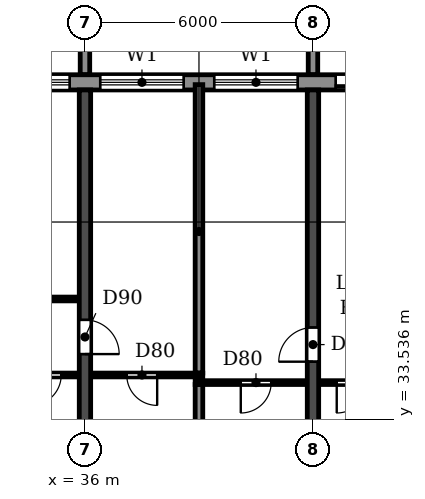
"""IFC4 building model, lengths in metres.
Left out: names, types, materials, properties, quantities, classifications, styles, units other than length and angle.
Written with IfcOpenShell. Run it as: python <this file> out.ifc"""

import sys

from ifc_helpers import new_model, si_unit, direction, frame, frame_2d, origin, place, context, subcontext, project, spatial, polyline, rectangle, outline, extrude, source, transform, mapped, element, fill, save


model = new_model("IFC4")
c1 = context("Model", 3, precision=1e-05, world=origin(), true_north=direction((0.0, 1.0)))
c2 = subcontext(c1, "Body", "Model", "MODEL_VIEW")
j1 = project(units=[si_unit("LENGTHUNIT", "METRE"), si_unit("PLANEANGLEUNIT", "RADIAN")], contexts=[c1])
p1 = place(None, origin())
s1 = spatial("IfcSite", under=j1, at=p1, CompositionType="ELEMENT")
p2 = place(p1, origin())
s2 = spatial("IfcBuilding", under=s1, at=p2, CompositionType="ELEMENT")
p3 = place(p2, frame((0.0, 0.0, 155.4)))
s3 = spatial("IfcBuildingStorey", under=s2, at=p3, CompositionType="ELEMENT", Elevation=155.4)
p4 = place(p3, frame((36.0, 30.525, 0.0), z_axis=(0.0, 0.0, 1.0), x_axis=(0.0, 1.0, 0.0)))
e1 = element("IfcWall", 1, at=p4, inside=s3, PredefinedType="SHEAR", context=c2, shape_type="SweptSolid", body=[
    extrude(rectangle(XDim=11.675, YDim=0.3, at=frame_2d((5.837, 0.0))), origin(), (0.0, 0.0, 1.0), 3.0),
])
p5 = place(p4, frame((4.725, 0.0, 0.0)))
e2 = element("IfcOpeningElement", 2, at=p5, cuts=e1, PredefinedType="OPENING", context=c2, shape_type="SweptSolid", body=[
    extrude(rectangle(XDim=0.9, YDim=2.1, at=frame_2d((0.45, 1.05))), frame((0.0, 0.16, 0.0), z_axis=(0.0, -1.0, 0.0), x_axis=(1.0, 0.0, 0.0)), (0.0, 0.0, 1.0), 0.32),
])
p6 = place(p3, frame((42.0, 30.525, 0.0), z_axis=(0.0, 0.0, 1.0), x_axis=(0.0, 1.0, 0.0)))
e3 = element("IfcWall", 3, at=p6, inside=s3, PredefinedType="SHEAR", context=c2, shape_type="SweptSolid", body=[
    extrude(rectangle(XDim=11.675, YDim=0.3, at=frame_2d((5.837, 0.0))), origin(), (0.0, 0.0, 1.0), 3.0),
])
p7 = place(p6, frame((4.525, 0.0, 0.0)))
e4 = element("IfcOpeningElement", 4, at=p7, cuts=e3, PredefinedType="OPENING", context=c2, shape_type="SweptSolid", body=[
    extrude(rectangle(XDim=0.9, YDim=2.1, at=frame_2d((0.45, 1.05))), frame((0.0, 0.16, 0.0), z_axis=(0.0, -1.0, 0.0), x_axis=(1.0, 0.0, 0.0)), (0.0, 0.0, 1.0), 0.32),
])
p8 = place(p3, frame((85.317, 42.4, 0.0), z_axis=(0.0, 0.0, 1.0), x_axis=(-1.0, 0.0, 0.0)))
e5 = element("IfcWall", 5, at=p8, inside=s3, PredefinedType="STANDARD", context=c2, shape_type="SweptSolid", body=[
    extrude(rectangle(XDim=68.634, YDim=0.4, at=frame_2d((34.317, 0.0))), origin(), (0.0, 0.0, 1.0), 3.0),
])
p9 = place(p8, frame((64.917, 0.0, 0.0)))
e6 = element("IfcOpeningElement", 6, at=p9, cuts=e5, PredefinedType="OPENING", context=c2, shape_type="SweptSolid", body=[
    extrude(rectangle(XDim=1.8, YDim=2.4, at=frame_2d((0.9, 1.2))), frame((0.0, 0.21, 0.0), z_axis=(0.0, -1.0, 0.0), x_axis=(1.0, 0.0, 0.0)), (0.0, 0.0, 1.0), 0.42),
])
p10 = place(p8, frame((61.717, 0.0, 0.9)))
e7 = element("IfcOpeningElement", 7, at=p10, cuts=e5, PredefinedType="OPENING", context=c2, shape_type="SweptSolid", body=[
    extrude(rectangle(XDim=2.2, YDim=1.5, at=frame_2d((1.1, 0.75))), frame((0.0, 0.21, 0.0), z_axis=(0.0, -1.0, 0.0), x_axis=(1.0, 0.0, 0.0)), (0.0, 0.0, 1.0), 0.42),
])
p11 = place(p8, frame((58.717, 0.0, 0.9)))
e8 = element("IfcOpeningElement", 8, at=p11, cuts=e5, PredefinedType="OPENING", context=c2, shape_type="SweptSolid", body=[
    extrude(rectangle(XDim=2.2, YDim=1.5, at=frame_2d((1.1, 0.75))), frame((0.0, 0.21, 0.0), z_axis=(0.0, -1.0, 0.0), x_axis=(1.0, 0.0, 0.0)), (0.0, 0.0, 1.0), 0.42),
])
p12 = place(p8, frame((55.917, 0.0, 0.0)))
e9 = element("IfcOpeningElement", 9, at=p12, cuts=e5, PredefinedType="OPENING", context=c2, shape_type="SweptSolid", body=[
    extrude(rectangle(XDim=1.8, YDim=2.4, at=frame_2d((0.9, 1.2))), frame((0.0, 0.21, 0.0), z_axis=(0.0, -1.0, 0.0), x_axis=(1.0, 0.0, 0.0)), (0.0, 0.0, 1.0), 0.42),
])
p13 = place(p8, frame((52.917, 0.0, 0.0)))
e10 = element("IfcOpeningElement", 10, at=p13, cuts=e5, PredefinedType="OPENING", context=c2, shape_type="SweptSolid", body=[
    extrude(rectangle(XDim=1.8, YDim=2.4, at=frame_2d((0.9, 1.2))), frame((0.0, 0.21, 0.0), z_axis=(0.0, -1.0, 0.0), x_axis=(1.0, 0.0, 0.0)), (0.0, 0.0, 1.0), 0.42),
])
p14 = place(p8, frame((49.717, 0.0, 0.9)))
e11 = element("IfcOpeningElement", 11, at=p14, cuts=e5, PredefinedType="OPENING", context=c2, shape_type="SweptSolid", body=[
    extrude(rectangle(XDim=2.2, YDim=1.5, at=frame_2d((1.1, 0.75))), frame((0.0, 0.21, 0.0), z_axis=(0.0, -1.0, 0.0), x_axis=(1.0, 0.0, 0.0)), (0.0, 0.0, 1.0), 0.42),
])
p15 = place(p8, frame((46.717, 0.0, 0.9)))
e12 = element("IfcOpeningElement", 12, at=p15, cuts=e5, PredefinedType="OPENING", context=c2, shape_type="SweptSolid", body=[
    extrude(rectangle(XDim=2.2, YDim=1.5, at=frame_2d((1.1, 0.75))), frame((0.0, 0.21, 0.0), z_axis=(0.0, -1.0, 0.0), x_axis=(1.0, 0.0, 0.0)), (0.0, 0.0, 1.0), 0.42),
])
p16 = place(p8, frame((43.717, 0.0, 0.9)))
e13 = element("IfcOpeningElement", 13, at=p16, cuts=e5, PredefinedType="OPENING", context=c2, shape_type="SweptSolid", body=[
    extrude(rectangle(XDim=2.2, YDim=1.5, at=frame_2d((1.1, 0.75))), frame((0.0, 0.21, 0.0), z_axis=(0.0, -1.0, 0.0), x_axis=(1.0, 0.0, 0.0)), (0.0, 0.0, 1.0), 0.42),
])
p17 = place(p8, frame((40.917, 0.0, 0.0)))
e14 = element("IfcOpeningElement", 14, at=p17, cuts=e5, PredefinedType="OPENING", context=c2, shape_type="SweptSolid", body=[
    extrude(rectangle(XDim=1.8, YDim=2.4, at=frame_2d((0.9, 1.2))), frame((0.0, 0.21, 0.0), z_axis=(0.0, -1.0, 0.0), x_axis=(1.0, 0.0, 0.0)), (0.0, 0.0, 1.0), 0.42),
])
p18 = place(p8, frame((37.717, 0.0, 0.9)))
e15 = element("IfcOpeningElement", 15, at=p18, cuts=e5, PredefinedType="OPENING", context=c2, shape_type="SweptSolid", body=[
    extrude(rectangle(XDim=2.2, YDim=1.5, at=frame_2d((1.1, 0.75))), frame((0.0, 0.21, 0.0), z_axis=(0.0, -1.0, 0.0), x_axis=(1.0, 0.0, 0.0)), (0.0, 0.0, 1.0), 0.42),
])
p19 = place(p8, frame((34.917, 0.0, 0.0)))
e16 = element("IfcOpeningElement", 16, at=p19, cuts=e5, PredefinedType="OPENING", context=c2, shape_type="SweptSolid", body=[
    extrude(rectangle(XDim=1.8, YDim=2.4, at=frame_2d((0.9, 1.2))), frame((0.0, 0.21, 0.0), z_axis=(0.0, -1.0, 0.0), x_axis=(1.0, 0.0, 0.0)), (0.0, 0.0, 1.0), 0.42),
])
p20 = place(p8, frame((31.717, 0.0, 0.9)))
e17 = element("IfcOpeningElement", 17, at=p20, cuts=e5, PredefinedType="OPENING", context=c2, shape_type="SweptSolid", body=[
    extrude(rectangle(XDim=2.2, YDim=1.5, at=frame_2d((1.1, 0.75))), frame((0.0, 0.21, 0.0), z_axis=(0.0, -1.0, 0.0), x_axis=(1.0, 0.0, 0.0)), (0.0, 0.0, 1.0), 0.42),
])
p21 = place(p8, frame((28.717, 0.0, 0.9)))
e18 = element("IfcOpeningElement", 18, at=p21, cuts=e5, PredefinedType="OPENING", context=c2, shape_type="SweptSolid", body=[
    extrude(rectangle(XDim=2.2, YDim=1.5, at=frame_2d((1.1, 0.75))), frame((0.0, 0.21, 0.0), z_axis=(0.0, -1.0, 0.0), x_axis=(1.0, 0.0, 0.0)), (0.0, 0.0, 1.0), 0.42),
])
p22 = place(p8, frame((25.717, 0.0, 0.9)))
e19 = element("IfcOpeningElement", 19, at=p22, cuts=e5, PredefinedType="OPENING", context=c2, shape_type="SweptSolid", body=[
    extrude(rectangle(XDim=2.2, YDim=1.5, at=frame_2d((1.1, 0.75))), frame((0.0, 0.21, 0.0), z_axis=(0.0, -1.0, 0.0), x_axis=(1.0, 0.0, 0.0)), (0.0, 0.0, 1.0), 0.42),
])
p23 = place(p8, frame((22.717, 0.0, 0.9)))
e20 = element("IfcOpeningElement", 20, at=p23, cuts=e5, PredefinedType="OPENING", context=c2, shape_type="SweptSolid", body=[
    extrude(rectangle(XDim=2.2, YDim=1.5, at=frame_2d((1.1, 0.75))), frame((0.0, 0.21, 0.0), z_axis=(0.0, -1.0, 0.0), x_axis=(1.0, 0.0, 0.0)), (0.0, 0.0, 1.0), 0.42),
])
p24 = place(p8, frame((19.917, 0.0, 0.0)))
e21 = element("IfcOpeningElement", 21, at=p24, cuts=e5, PredefinedType="OPENING", context=c2, shape_type="SweptSolid", body=[
    extrude(rectangle(XDim=1.8, YDim=2.4, at=frame_2d((0.9, 1.2))), frame((0.0, 0.21, 0.0), z_axis=(0.0, -1.0, 0.0), x_axis=(1.0, 0.0, 0.0)), (0.0, 0.0, 1.0), 0.42),
])
p25 = place(p8, frame((16.717, 0.0, 0.9)))
e22 = element("IfcOpeningElement", 22, at=p25, cuts=e5, PredefinedType="OPENING", context=c2, shape_type="SweptSolid", body=[
    extrude(rectangle(XDim=2.2, YDim=1.5, at=frame_2d((1.1, 0.75))), frame((0.0, 0.21, 0.0), z_axis=(0.0, -1.0, 0.0), x_axis=(1.0, 0.0, 0.0)), (0.0, 0.0, 1.0), 0.42),
])
p26 = place(p8, frame((13.717, 0.0, 0.9)))
e23 = element("IfcOpeningElement", 23, at=p26, cuts=e5, PredefinedType="OPENING", context=c2, shape_type="SweptSolid", body=[
    extrude(rectangle(XDim=2.2, YDim=1.5, at=frame_2d((1.1, 0.75))), frame((0.0, 0.21, 0.0), z_axis=(0.0, -1.0, 0.0), x_axis=(1.0, 0.0, 0.0)), (0.0, 0.0, 1.0), 0.42),
])
p27 = place(p8, frame((10.917, 0.0, 0.0)))
e24 = element("IfcOpeningElement", 24, at=p27, cuts=e5, PredefinedType="OPENING", context=c2, shape_type="SweptSolid", body=[
    extrude(rectangle(XDim=1.8, YDim=2.4, at=frame_2d((0.9, 1.2))), frame((0.0, 0.21, 0.0), z_axis=(0.0, -1.0, 0.0), x_axis=(1.0, 0.0, 0.0)), (0.0, 0.0, 1.0), 0.42),
])
p28 = place(p8, frame((7.717, 0.0, 0.9)))
e25 = element("IfcOpeningElement", 25, at=p28, cuts=e5, PredefinedType="OPENING", context=c2, shape_type="SweptSolid", body=[
    extrude(rectangle(XDim=2.2, YDim=1.5, at=frame_2d((1.1, 0.75))), frame((0.0, 0.21, 0.0), z_axis=(0.0, -1.0, 0.0), x_axis=(1.0, 0.0, 0.0)), (0.0, 0.0, 1.0), 0.42),
])
p29 = place(p8, frame((4.717, 0.0, 0.9)))
e26 = element("IfcOpeningElement", 26, at=p29, cuts=e5, PredefinedType="OPENING", context=c2, shape_type="SweptSolid", body=[
    extrude(rectangle(XDim=2.2, YDim=1.5, at=frame_2d((1.1, 0.75))), frame((0.0, 0.21, 0.0), z_axis=(0.0, -1.0, 0.0), x_axis=(1.0, 0.0, 0.0)), (0.0, 0.0, 1.0), 0.42),
])
p30 = place(p8, frame((1.917, 0.0, 0.0)))
e27 = element("IfcOpeningElement", 27, at=p30, cuts=e5, PredefinedType="OPENING", context=c2, shape_type="SweptSolid", body=[
    extrude(rectangle(XDim=1.8, YDim=2.4, at=frame_2d((0.9, 1.2))), frame((0.0, 0.21, 0.0), z_axis=(0.0, -1.0, 0.0), x_axis=(1.0, 0.0, 0.0)), (0.0, 0.0, 1.0), 0.42),
])
m1 = source(origin(), c2, "Body", "SweptSolid", [
    extrude(outline(polyline([(0.0, 0.0), (0.25, 0.0), (0.25, 3.1), (0.0, 3.1), (0.0, 0.0)])), origin(), (0.0, 0.0, 1.0), 3.1),
])
for number, where in (
    (28, (35.875, 42.6, 0.0)),
    (29, (41.875, 42.6, 0.0)),
):
    element("IfcWall", number, at=place(p3, frame(where)), inside=s3, PredefinedType="STANDARD", context=c2, shape_type="MappedRepresentation", body=[
        mapped(m1, transform((0.0, 0.0, 0.0))),
    ])
p31 = place(p3, frame((39.0, 30.535, 0.0), z_axis=(0.0, 0.0, 1.0), x_axis=(0.0, 1.0, 0.0)))
e30 = element("IfcWall", 30, at=p31, inside=s3, PredefinedType="PARTITIONING", context=c2, shape_type="SweptSolid", body=[
    extrude(rectangle(XDim=3.915, YDim=0.2, at=frame_2d((1.958, 0.0))), origin(), (0.0, 0.0, 1.0), 3.0),
])
p32 = place(p3, frame((39.0, 34.75, 0.0), z_axis=(0.0, 0.0, 1.0), x_axis=(0.0, 1.0, 0.0)))
e31 = element("IfcWall", 31, at=p32, inside=s3, PredefinedType="PARTITIONING", context=c2, shape_type="SweptSolid", body=[
    extrude(rectangle(XDim=7.59, YDim=0.2, at=frame_2d((3.795, 0.0))), origin(), (0.0, 0.0, 1.0), 3.0),
])
p33 = place(p3, frame((38.9, 34.5, 0.0), z_axis=(0.0, 0.0, 1.0), x_axis=(1.0, 0.0, 0.0)))
e32 = element("IfcWall", 32, at=p33, inside=s3, PredefinedType="PARTITIONING", context=c2, shape_type="SweptSolid", body=[
    extrude(rectangle(XDim=2.94, YDim=0.1, at=frame_2d((1.47, 0.0))), origin(), (0.0, 0.0, 1.0), 3.0),
])
p34 = place(p33, frame((1.2, 0.0, 0.0)))
e33 = element("IfcOpeningElement", 33, at=p34, cuts=e32, PredefinedType="OPENING", context=c2, shape_type="SweptSolid", body=[
    extrude(rectangle(XDim=0.8, YDim=2.1, at=frame_2d((0.4, 1.05))), frame((0.0, 0.06, 0.0), z_axis=(0.0, -1.0, 0.0), x_axis=(1.0, 0.0, 0.0)), (0.0, 0.0, 1.0), 0.12),
])
p35 = place(p3, frame((42.16, 34.5, 0.0), z_axis=(0.0, 0.0, 1.0), x_axis=(1.0, 0.0, 0.0)))
e34 = element("IfcWall", 34, at=p35, inside=s3, PredefinedType="PARTITIONING", context=c2, shape_type="SweptSolid", body=[
    extrude(rectangle(XDim=1.94, YDim=0.1, at=frame_2d((0.97, 0.0))), origin(), (0.0, 0.0, 1.0), 3.0),
])
p36 = place(p35, frame((0.465, 0.0, 0.0)))
e35 = element("IfcOpeningElement", 35, at=p36, cuts=e34, PredefinedType="OPENING", context=c2, shape_type="SweptSolid", body=[
    extrude(rectangle(XDim=0.8, YDim=2.1, at=frame_2d((0.4, 1.05))), frame((0.0, 0.06, 0.0), z_axis=(0.0, -1.0, 0.0), x_axis=(1.0, 0.0, 0.0)), (0.0, 0.0, 1.0), 0.12),
])
p37 = place(p3, frame((33.9, 34.7, 0.0), z_axis=(0.0, 0.0, 1.0), x_axis=(1.0, 0.0, 0.0)))
e36 = element("IfcWall", 36, at=p37, inside=s3, PredefinedType="PARTITIONING", context=c2, shape_type="SweptSolid", body=[
    extrude(rectangle(XDim=1.94, YDim=0.1, at=frame_2d((0.97, 0.0))), origin(), (0.0, 0.0, 1.0), 3.0),
])
p38 = place(p37, frame((0.675, 0.0, 0.0)))
e37 = element("IfcOpeningElement", 37, at=p38, cuts=e36, PredefinedType="OPENING", context=c2, shape_type="SweptSolid", body=[
    extrude(rectangle(XDim=0.8, YDim=2.1, at=frame_2d((0.4, 1.05))), frame((0.0, 0.06, 0.0), z_axis=(0.0, -1.0, 0.0), x_axis=(1.0, 0.0, 0.0)), (0.0, 0.0, 1.0), 0.12),
])
p39 = place(p3, frame((36.16, 34.7, 0.0), z_axis=(0.0, 0.0, 1.0), x_axis=(1.0, 0.0, 0.0)))
e38 = element("IfcWall", 38, at=p39, inside=s3, PredefinedType="PARTITIONING", context=c2, shape_type="SweptSolid", body=[
    extrude(rectangle(XDim=2.94, YDim=0.1, at=frame_2d((1.47, 0.0))), origin(), (0.0, 0.0, 1.0), 3.0),
])
p40 = place(p39, frame((0.94, 0.0, 0.0)))
e39 = element("IfcOpeningElement", 39, at=p40, cuts=e38, PredefinedType="OPENING", context=c2, shape_type="SweptSolid", body=[
    extrude(rectangle(XDim=0.8, YDim=2.1, at=frame_2d((0.4, 1.05))), frame((0.0, 0.06, 0.0), z_axis=(0.0, -1.0, 0.0), x_axis=(1.0, 0.0, 0.0)), (0.0, 0.0, 1.0), 0.12),
])
p41 = place(p3, frame((32.95, 36.7, 0.0), z_axis=(0.0, 0.0, 1.0), x_axis=(1.0, 0.0, 0.0)))
e40 = element("IfcWall", 40, at=p41, inside=s3, PredefinedType="PARTITIONING", context=c2, shape_type="SweptSolid", body=[
    extrude(rectangle(XDim=2.89, YDim=0.1, at=frame_2d((1.445, 0.0))), origin(), (0.0, 0.0, 1.0), 3.0),
])
p42 = place(p41, frame((0.55, 0.0, 0.0)))
e41 = element("IfcOpeningElement", 41, at=p42, cuts=e40, PredefinedType="OPENING", context=c2, shape_type="SweptSolid", body=[
    extrude(rectangle(XDim=0.9, YDim=2.1, at=frame_2d((0.45, 1.05))), frame((0.0, 0.06, 0.0), z_axis=(0.0, -1.0, 0.0), x_axis=(1.0, 0.0, 0.0)), (0.0, 0.0, 1.0), 0.12),
])
p43 = place(p14, origin())
e42 = element("IfcWindow", 42, at=p43, inside=s3, PartitioningType="DOUBLE_PANEL_HORIZONTAL", PredefinedType="WINDOW", context=c2, shape_type="SweptSolid", body=[
    extrude(rectangle(XDim=2.2, YDim=1.5, at=frame_2d((1.1, 0.75))), frame((0.0, 0.03, 0.0), z_axis=(0.0, -1.0, 0.0), x_axis=(1.0, 0.0, 0.0)), (0.0, 0.0, 1.0), 0.06),
])
fill(e11, e42)
p44 = place(p15, origin())
e43 = element("IfcWindow", 43, at=p44, inside=s3, PartitioningType="DOUBLE_PANEL_HORIZONTAL", PredefinedType="WINDOW", context=c2, shape_type="SweptSolid", body=[
    extrude(rectangle(XDim=2.2, YDim=1.5, at=frame_2d((1.1, 0.75))), frame((0.0, 0.03, 0.0), z_axis=(0.0, -1.0, 0.0), x_axis=(1.0, 0.0, 0.0)), (0.0, 0.0, 1.0), 0.06),
])
fill(e12, e43)
p45 = place(p16, origin())
e44 = element("IfcWindow", 44, at=p45, inside=s3, PartitioningType="DOUBLE_PANEL_HORIZONTAL", PredefinedType="WINDOW", context=c2, shape_type="SweptSolid", body=[
    extrude(rectangle(XDim=2.2, YDim=1.5, at=frame_2d((1.1, 0.75))), frame((0.0, 0.03, 0.0), z_axis=(0.0, -1.0, 0.0), x_axis=(1.0, 0.0, 0.0)), (0.0, 0.0, 1.0), 0.06),
])
fill(e13, e44)
p46 = place(p17, origin())
e45 = element("IfcDoor", 45, at=p46, inside=s3, OperationType="DOUBLE_DOOR_SLIDING", PredefinedType="DOOR", context=c2, shape_type="SweptSolid", body=[
    extrude(rectangle(XDim=1.8, YDim=2.4, at=frame_2d((0.9, 1.2))), frame((0.0, 0.025, 0.0), z_axis=(0.0, -1.0, 0.0), x_axis=(1.0, 0.0, 0.0)), (0.0, 0.0, 1.0), 0.05),
])
fill(e14, e45)
p47 = place(p40, frame((0.8, 0.0, 0.0), z_axis=(0.0, 0.0, 1.0), x_axis=(-1.0, 0.0, 0.0)))
e46 = element("IfcDoor", 46, at=p47, inside=s3, OperationType="SINGLE_SWING_LEFT", PredefinedType="DOOR", context=c2, shape_type="SweptSolid", body=[
    extrude(rectangle(XDim=0.8, YDim=2.1, at=frame_2d((0.4, 1.05))), frame((0.0, 0.025, 0.0), z_axis=(0.0, -1.0, 0.0), x_axis=(1.0, 0.0, 0.0)), (0.0, 0.0, 1.0), 0.05),
])
fill(e39, e46)
p48 = place(p38, frame((0.8, 0.0, 0.0), z_axis=(0.0, 0.0, 1.0), x_axis=(-1.0, 0.0, 0.0)))
e47 = element("IfcDoor", 47, at=p48, inside=s3, OperationType="SINGLE_SWING_RIGHT", PredefinedType="DOOR", context=c2, shape_type="SweptSolid", body=[
    extrude(rectangle(XDim=0.8, YDim=2.1, at=frame_2d((0.4, 1.05))), frame((0.0, 0.025, 0.0), z_axis=(0.0, -1.0, 0.0), x_axis=(1.0, 0.0, 0.0)), (0.0, 0.0, 1.0), 0.05),
])
fill(e37, e47)
p49 = place(p5, frame((0.9, 0.0, 0.0), z_axis=(0.0, 0.0, 1.0), x_axis=(-1.0, 0.0, 0.0)))
e48 = element("IfcDoor", 48, at=p49, inside=s3, OperationType="SINGLE_SWING_RIGHT", PredefinedType="DOOR", context=c2, shape_type="SweptSolid", body=[
    extrude(rectangle(XDim=0.9, YDim=2.1, at=frame_2d((0.45, 1.05))), frame((0.0, 0.025, 0.0), z_axis=(0.0, -1.0, 0.0), x_axis=(1.0, 0.0, 0.0)), (0.0, 0.0, 1.0), 0.05),
])
fill(e2, e48)
p50 = place(p34, frame((0.8, 0.0, 0.0), z_axis=(0.0, 0.0, 1.0), x_axis=(-1.0, 0.0, 0.0)))
e49 = element("IfcDoor", 49, at=p50, inside=s3, OperationType="SINGLE_SWING_RIGHT", PredefinedType="DOOR", context=c2, shape_type="SweptSolid", body=[
    extrude(rectangle(XDim=0.8, YDim=2.1, at=frame_2d((0.4, 1.05))), frame((0.0, 0.025, 0.0), z_axis=(0.0, -1.0, 0.0), x_axis=(1.0, 0.0, 0.0)), (0.0, 0.0, 1.0), 0.05),
])
fill(e33, e49)
p51 = place(p7, origin())
e50 = element("IfcDoor", 50, at=p51, inside=s3, OperationType="SINGLE_SWING_LEFT", PredefinedType="DOOR", context=c2, shape_type="SweptSolid", body=[
    extrude(rectangle(XDim=0.9, YDim=2.1, at=frame_2d((0.45, 1.05))), frame((0.0, 0.025, 0.0), z_axis=(0.0, -1.0, 0.0), x_axis=(1.0, 0.0, 0.0)), (0.0, 0.0, 1.0), 0.05),
])
fill(e4, e50)
p52 = place(p36, frame((0.8, 0.0, 0.0), z_axis=(0.0, 0.0, 1.0), x_axis=(-1.0, 0.0, 0.0)))
e51 = element("IfcDoor", 51, at=p52, inside=s3, OperationType="SINGLE_SWING_RIGHT", PredefinedType="DOOR", context=c2, shape_type="SweptSolid", body=[
    extrude(rectangle(XDim=0.8, YDim=2.1, at=frame_2d((0.4, 1.05))), frame((0.0, 0.025, 0.0), z_axis=(0.0, -1.0, 0.0), x_axis=(1.0, 0.0, 0.0)), (0.0, 0.0, 1.0), 0.05),
])
fill(e35, e51)
save(model, sys.argv[1])
